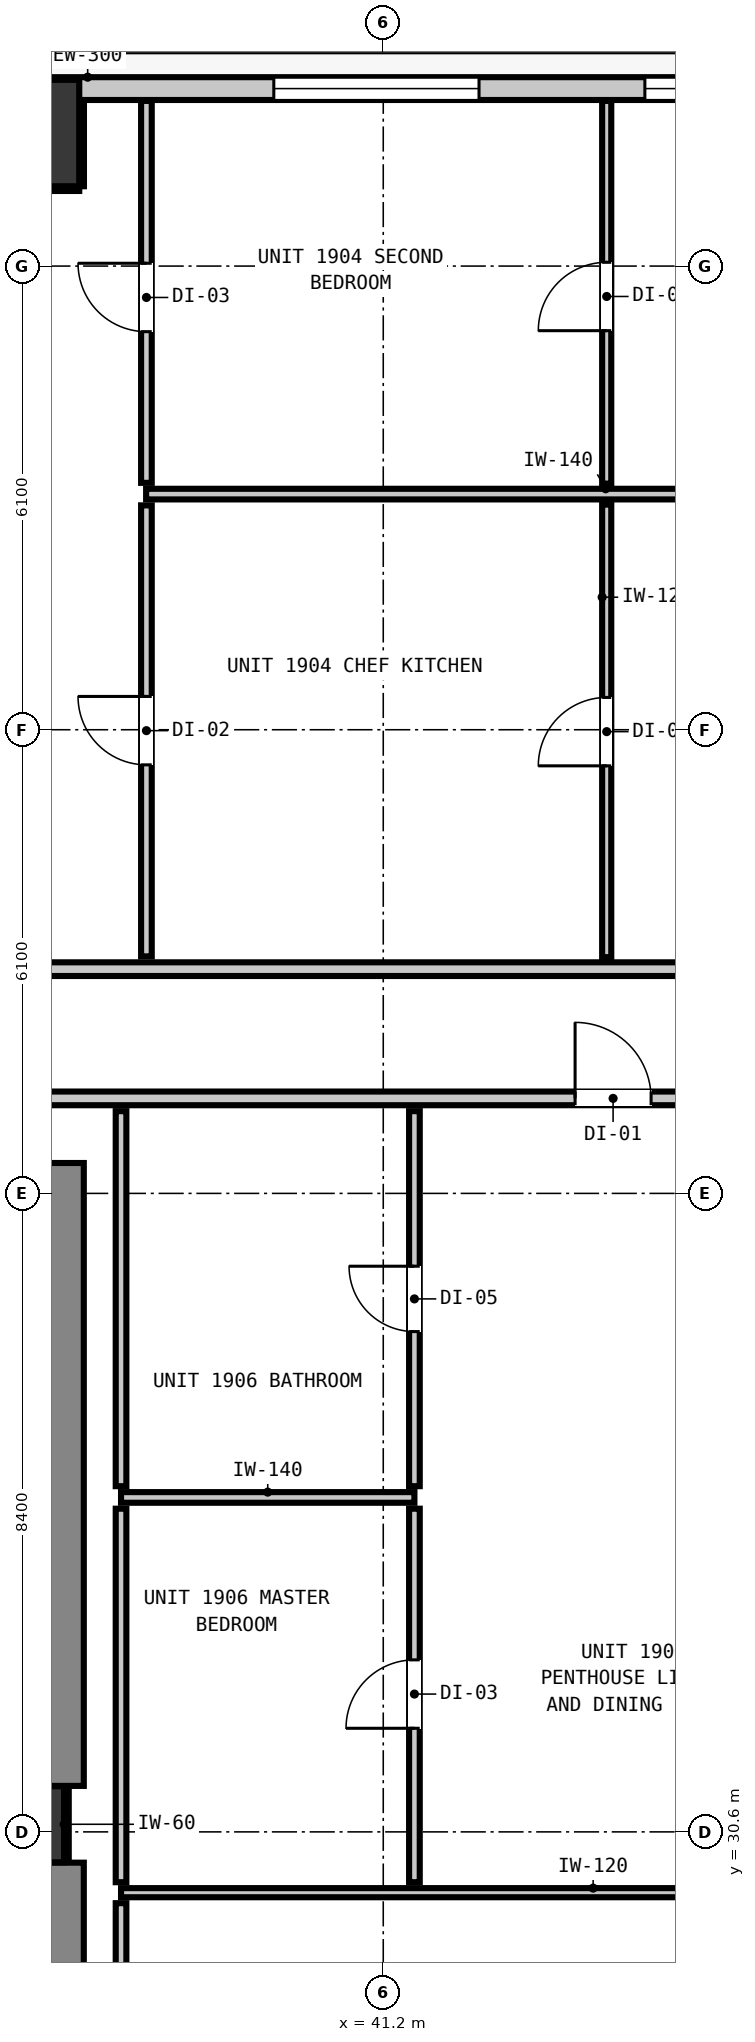
"""IFC4 building model, lengths in metres.
Left out: names, types, materials, properties, quantities, classifications, styles, units other than length and angle.
Written with IfcOpenShell. Run it as: python <this file> out.ifc"""

import sys

from ifc_helpers import new_model, si_unit, direction, frame, frame_2d, origin, origin_2d, place, context, subcontext, project, spatial, rectangle, extrude, element, fill, save


model = new_model("IFC4")
c1 = context("Model", 3, precision=1e-05, world=origin(), true_north=direction((0.0, 1.0)))
c2 = subcontext(c1, "Body", "Model", "MODEL_VIEW")
j1 = project(units=[si_unit("LENGTHUNIT", "METRE"), si_unit("PLANEANGLEUNIT", "RADIAN")], contexts=[c1])
p1 = place(None, origin())
s1 = spatial("IfcSite", under=j1, at=p1, CompositionType="ELEMENT")
p2 = place(p1, origin())
s2 = spatial("IfcBuilding", under=s1, at=p2, CompositionType="ELEMENT")
p3 = place(p2, frame((0.0, 0.0, 68.48)))
s3 = spatial("IfcBuildingStorey", under=s2, at=p3, CompositionType="ELEMENT", Elevation=68.48)
p4 = place(p3, frame((36.5, 30.7, 0.0), z_axis=(0.0, 0.0, 1.0), x_axis=(1.0, 0.0, 0.0)))
e1 = element("IfcColumn", 1, at=p4, inside=s3, PredefinedType="COLUMN", context=c2, shape_type="SweptSolid", body=[
    extrude(rectangle(XDim=1.0, YDim=1.0, at=origin_2d()), origin(), (0.0, 0.0, 1.0), 3.32),
])
p5 = place(p3, frame((36.66, 22.0, 0.0), z_axis=(0.0, 0.0, 1.0), x_axis=(0.0, 1.0, 0.0)))
e2 = element("IfcWall", 2, at=p5, inside=s3, PredefinedType="SHEAR", context=c2, shape_type="SweptSolid", body=[
    extrude(rectangle(XDim=8.195, YDim=1.2, at=frame_2d((4.098, 0.0))), origin(), (0.0, 0.0, 1.0), 3.32),
])
p6 = place(p3, frame((36.66, 31.205, 0.0), z_axis=(0.0, 0.0, 1.0), x_axis=(0.0, 1.0, 0.0)))
e3 = element("IfcWall", 3, at=p6, inside=s3, PredefinedType="SHEAR", context=c2, shape_type="SweptSolid", body=[
    extrude(rectangle(XDim=8.195, YDim=1.2, at=frame_2d((4.097, 0.0))), origin(), (0.0, 0.0, 1.0), 3.32),
])
p7 = place(p3, frame((36.5, 52.95, 0.0), z_axis=(0.0, 0.0, 1.0), x_axis=(1.0, 0.0, 0.0)))
e4 = element("IfcColumn", 4, at=p7, inside=s3, PredefinedType="COLUMN", context=c2, shape_type="SweptSolid", body=[
    extrude(rectangle(XDim=1.4, YDim=1.4, at=origin_2d()), origin(), (0.0, 0.0, 1.0), 3.32),
])
p8 = place(p3, frame((10.365, 53.535, 0.0), z_axis=(0.0, 0.0, 1.0), x_axis=(1.0, 0.0, 0.0)))
e5 = element("IfcWall", 5, at=p8, inside=s3, PredefinedType="STANDARD", context=c2, shape_type="SweptSolid", body=[
    extrude(rectangle(XDim=37.47, YDim=0.3, at=frame_2d((18.735, 0.0))), origin(), (0.0, 0.0, 1.0), 3.06),
])
p9 = place(p8, frame((4.403, 0.0, 0.0)))
e6 = element("IfcOpeningElement", 6, at=p9, cuts=e5, PredefinedType="OPENING", context=c2, shape_type="SweptSolid", body=[
    extrude(rectangle(XDim=1.0, YDim=2.15, at=frame_2d((0.5, 1.075))), frame((0.0, 0.16, 0.0), z_axis=(0.0, -1.0, 0.0), x_axis=(1.0, 0.0, 0.0)), (0.0, 0.0, 1.0), 0.32),
])
p10 = place(p8, frame((6.319, 0.0, 0.85)))
e7 = element("IfcOpeningElement", 7, at=p10, cuts=e5, PredefinedType="OPENING", context=c2, shape_type="SweptSolid", body=[
    extrude(rectangle(XDim=2.7, YDim=2.0, at=frame_2d((1.35, 1.0))), frame((0.0, 0.16, 0.0), z_axis=(0.0, -1.0, 0.0), x_axis=(1.0, 0.0, 0.0)), (0.0, 0.0, 1.0), 0.32),
])
p11 = place(p8, frame((0.324, 0.0, 0.85)))
e8 = element("IfcOpeningElement", 8, at=p11, cuts=e5, PredefinedType="OPENING", context=c2, shape_type="SweptSolid", body=[
    extrude(rectangle(XDim=0.58, YDim=1.5, at=frame_2d((0.29, 0.75))), frame((0.0, 0.16, 0.0), z_axis=(0.0, -1.0, 0.0), x_axis=(1.0, 0.0, 0.0)), (0.0, 0.0, 1.0), 0.32),
])
p12 = place(p8, frame((13.221, 0.0, 0.85)))
e9 = element("IfcOpeningElement", 9, at=p12, cuts=e5, PredefinedType="OPENING", context=c2, shape_type="SweptSolid", body=[
    extrude(rectangle(XDim=2.7, YDim=2.0, at=frame_2d((1.35, 1.0))), frame((0.0, 0.16, 0.0), z_axis=(0.0, -1.0, 0.0), x_axis=(1.0, 0.0, 0.0)), (0.0, 0.0, 1.0), 0.32),
])
p13 = place(p8, frame((21.797, 0.0, 0.85)))
e10 = element("IfcOpeningElement", 10, at=p13, cuts=e5, PredefinedType="OPENING", context=c2, shape_type="SweptSolid", body=[
    extrude(rectangle(XDim=2.7, YDim=2.0, at=frame_2d((1.35, 1.0))), frame((0.0, 0.16, 0.0), z_axis=(0.0, -1.0, 0.0), x_axis=(1.0, 0.0, 0.0)), (0.0, 0.0, 1.0), 0.32),
])
p14 = place(p8, frame((19.807, 0.0, 0.85)))
e11 = element("IfcOpeningElement", 11, at=p14, cuts=e5, PredefinedType="OPENING", context=c2, shape_type="SweptSolid", body=[
    extrude(rectangle(XDim=0.58, YDim=1.5, at=frame_2d((0.29, 0.75))), frame((0.0, 0.16, 0.0), z_axis=(0.0, -1.0, 0.0), x_axis=(1.0, 0.0, 0.0)), (0.0, 0.0, 1.0), 0.32),
])
p15 = place(p8, frame((29.395, 0.0, 0.85)))
e12 = element("IfcOpeningElement", 12, at=p15, cuts=e5, PredefinedType="OPENING", context=c2, shape_type="SweptSolid", body=[
    extrude(rectangle(XDim=2.7, YDim=2.0, at=frame_2d((1.35, 1.0))), frame((0.0, 0.16, 0.0), z_axis=(0.0, -1.0, 0.0), x_axis=(1.0, 0.0, 0.0)), (0.0, 0.0, 1.0), 0.32),
])
p16 = place(p8, frame((34.277, 0.0, 0.85)))
e13 = element("IfcOpeningElement", 13, at=p16, cuts=e5, PredefinedType="OPENING", context=c2, shape_type="SweptSolid", body=[
    extrude(rectangle(XDim=2.7, YDim=2.0, at=frame_2d((1.35, 1.0))), frame((0.0, 0.16, 0.0), z_axis=(0.0, -1.0, 0.0), x_axis=(1.0, 0.0, 0.0)), (0.0, 0.0, 1.0), 0.32),
])
p17 = place(p3, frame((10.15, 40.25, 0.0), z_axis=(0.0, 0.0, 1.0), x_axis=(1.0, 0.0, 0.0)))
e14 = element("IfcWall", 14, at=p17, inside=s3, PredefinedType="PARTITIONING", context=c2, shape_type="SweptSolid", body=[
    extrude(rectangle(XDim=40.023, YDim=0.18, at=frame_2d((20.012, 0.0))), origin(), (0.0, 0.0, 1.0), 3.06),
])
p18 = place(p17, frame((7.285, 0.0, 0.0)))
e15 = element("IfcOpeningElement", 15, at=p18, cuts=e14, PredefinedType="OPENING", context=c2, shape_type="SweptSolid", body=[
    extrude(rectangle(XDim=1.4, YDim=2.15, at=frame_2d((0.7, 1.075))), frame((0.0, 0.1, 0.0), z_axis=(0.0, -1.0, 0.0), x_axis=(1.0, 0.0, 0.0)), (0.0, 0.0, 1.0), 0.2),
])
p19 = place(p17, frame((0.324, 0.0, 0.0)))
e16 = element("IfcOpeningElement", 16, at=p19, cuts=e14, PredefinedType="OPENING", context=c2, shape_type="SweptSolid", body=[
    extrude(rectangle(XDim=1.4, YDim=2.15, at=frame_2d((0.7, 1.075))), frame((0.0, 0.1, 0.0), z_axis=(0.0, -1.0, 0.0), x_axis=(1.0, 0.0, 0.0)), (0.0, 0.0, 1.0), 0.2),
])
p20 = place(p17, frame((33.574, 0.0, 0.0)))
e17 = element("IfcOpeningElement", 17, at=p20, cuts=e14, PredefinedType="OPENING", context=c2, shape_type="SweptSolid", body=[
    extrude(rectangle(XDim=1.0, YDim=2.15, at=frame_2d((0.5, 1.075))), frame((0.0, 0.1, 0.0), z_axis=(0.0, -1.0, 0.0), x_axis=(1.0, 0.0, 0.0)), (0.0, 0.0, 1.0), 0.2),
])
p21 = place(p3, frame((8.027, 41.95, 0.0), z_axis=(0.0, 0.0, 1.0), x_axis=(1.0, 0.0, 0.0)))
e18 = element("IfcWall", 18, at=p21, inside=s3, PredefinedType="PARTITIONING", context=c2, shape_type="SweptSolid", body=[
    extrude(rectangle(XDim=42.146, YDim=0.18, at=frame_2d((21.073, 0.0))), origin(), (0.0, 0.0, 1.0), 3.06),
])
p22 = place(p21, frame((8.451, 0.0, 0.0)))
e19 = element("IfcOpeningElement", 19, at=p22, cuts=e18, PredefinedType="OPENING", context=c2, shape_type="SweptSolid", body=[
    extrude(rectangle(XDim=1.0, YDim=2.15, at=frame_2d((0.5, 1.075))), frame((0.0, 0.1, 0.0), z_axis=(0.0, -1.0, 0.0), x_axis=(1.0, 0.0, 0.0)), (0.0, 0.0, 1.0), 0.2),
])
p23 = place(p21, frame((26.075, 0.0, 0.0)))
e20 = element("IfcOpeningElement", 20, at=p23, cuts=e18, PredefinedType="OPENING", context=c2, shape_type="SweptSolid", body=[
    extrude(rectangle(XDim=1.0, YDim=2.15, at=frame_2d((0.5, 1.075))), frame((0.0, 0.1, 0.0), z_axis=(0.0, -1.0, 0.0), x_axis=(1.0, 0.0, 0.0)), (0.0, 0.0, 1.0), 0.2),
])
p24 = place(p3, frame((37.75, 35.0, 0.0), z_axis=(0.0, 0.0, 1.0), x_axis=(1.0, 0.0, 0.0)))
e21 = element("IfcWall", 21, at=p24, inside=s3, PredefinedType="PARTITIONING", context=c2, shape_type="SweptSolid", body=[
    extrude(rectangle(XDim=3.86, YDim=0.14, at=frame_2d((1.93, 0.0))), origin(), (0.0, 0.0, 1.0), 3.06),
])
p25 = place(p3, frame((38.08, 48.2, 0.0), z_axis=(0.0, 0.0, 1.0), x_axis=(1.0, 0.0, 0.0)))
e22 = element("IfcWall", 22, at=p25, inside=s3, PredefinedType="PARTITIONING", context=c2, shape_type="SweptSolid", body=[
    extrude(rectangle(XDim=12.093, YDim=0.14, at=frame_2d((6.046, 0.0))), origin(), (0.0, 0.0, 1.0), 3.06),
])
p26 = place(p3, frame((37.75, 29.8, 0.0), z_axis=(0.0, 0.0, 1.0), x_axis=(1.0, 0.0, 0.0)))
e23 = element("IfcWall", 23, at=p26, inside=s3, PredefinedType="PARTITIONING", context=c2, shape_type="SweptSolid", body=[
    extrude(rectangle(XDim=12.423, YDim=0.12, at=frame_2d((6.211, 0.0))), origin(), (0.0, 0.0, 1.0), 3.06),
])
p27 = place(p3, frame((37.75, 21.348, 0.0), z_axis=(0.0, 0.0, 1.0), x_axis=(0.0, 1.0, 0.0)))
e24 = element("IfcWall", 24, at=p27, inside=s3, PredefinedType="PARTITIONING", context=c2, shape_type="SweptSolid", body=[
    extrude(rectangle(XDim=8.314, YDim=0.14, at=frame_2d((4.157, 0.0))), origin(), (0.0, 0.0, 1.0), 3.06),
])
p28 = place(p3, frame((37.75, 29.938, 0.0), z_axis=(0.0, 0.0, 1.0), x_axis=(0.0, 1.0, 0.0)))
e25 = element("IfcWall", 25, at=p28, inside=s3, PredefinedType="PARTITIONING", context=c2, shape_type="SweptSolid", body=[
    extrude(rectangle(XDim=4.914, YDim=0.14, at=frame_2d((2.457, 0.0))), origin(), (0.0, 0.0, 1.0), 3.06),
])
p29 = place(p3, frame((37.75, 35.148, 0.0), z_axis=(0.0, 0.0, 1.0), x_axis=(0.0, 1.0, 0.0)))
e26 = element("IfcWall", 26, at=p29, inside=s3, PredefinedType="PARTITIONING", context=c2, shape_type="SweptSolid", body=[
    extrude(rectangle(XDim=4.934, YDim=0.14, at=frame_2d((2.467, 0.0))), origin(), (0.0, 0.0, 1.0), 3.06),
])
p30 = place(p3, frame((38.084, 42.118, 0.0), z_axis=(0.0, 0.0, 1.0), x_axis=(0.0, 1.0, 0.0)))
e27 = element("IfcWall", 27, at=p30, inside=s3, PredefinedType="PARTITIONING", context=c2, shape_type="SweptSolid", body=[
    extrude(rectangle(XDim=5.934, YDim=0.14, at=frame_2d((2.967, 0.0))), origin(), (0.0, 0.0, 1.0), 3.06),
])
p31 = place(p30, frame((2.52, 0.0, 0.0)))
e28 = element("IfcOpeningElement", 28, at=p31, cuts=e27, PredefinedType="OPENING", context=c2, shape_type="SweptSolid", body=[
    extrude(rectangle(XDim=0.9, YDim=2.1, at=frame_2d((0.45, 1.05))), frame((0.0, 0.08, 0.0), z_axis=(0.0, -1.0, 0.0), x_axis=(1.0, 0.0, 0.0)), (0.0, 0.0, 1.0), 0.16),
])
p32 = place(p3, frame((38.084, 48.348, 0.0), z_axis=(0.0, 0.0, 1.0), x_axis=(0.0, 1.0, 0.0)))
e29 = element("IfcWall", 29, at=p32, inside=s3, PredefinedType="PARTITIONING", context=c2, shape_type="SweptSolid", body=[
    extrude(rectangle(XDim=5.025, YDim=0.14, at=frame_2d((2.513, 0.0))), origin(), (0.0, 0.0, 1.0), 3.06),
])
p33 = place(p32, frame((1.989, 0.0, 0.0)))
e30 = element("IfcOpeningElement", 30, at=p33, cuts=e29, PredefinedType="OPENING", context=c2, shape_type="SweptSolid", body=[
    extrude(rectangle(XDim=0.9, YDim=2.1, at=frame_2d((0.45, 1.05))), frame((0.0, 0.08, 0.0), z_axis=(0.0, -1.0, 0.0), x_axis=(1.0, 0.0, 0.0)), (0.0, 0.0, 1.0), 0.16),
])
p34 = place(p3, frame((41.61, 29.938, 0.0), z_axis=(0.0, 0.0, 1.0), x_axis=(0.0, 1.0, 0.0)))
e31 = element("IfcWall", 31, at=p34, inside=s3, PredefinedType="PARTITIONING", context=c2, shape_type="SweptSolid", body=[
    extrude(rectangle(XDim=4.914, YDim=0.14, at=frame_2d((2.457, 0.0))), origin(), (0.0, 0.0, 1.0), 3.06),
])
p35 = place(p34, frame((2.025, 0.0, 0.0)))
e32 = element("IfcOpeningElement", 32, at=p35, cuts=e31, PredefinedType="OPENING", context=c2, shape_type="SweptSolid", body=[
    extrude(rectangle(XDim=0.9, YDim=2.1, at=frame_2d((0.45, 1.05))), frame((0.0, 0.08, 0.0), z_axis=(0.0, -1.0, 0.0), x_axis=(1.0, 0.0, 0.0)), (0.0, 0.0, 1.0), 0.16),
])
p36 = place(p3, frame((41.61, 35.148, 0.0), z_axis=(0.0, 0.0, 1.0), x_axis=(0.0, 1.0, 0.0)))
e33 = element("IfcWall", 33, at=p36, inside=s3, PredefinedType="PARTITIONING", context=c2, shape_type="SweptSolid", body=[
    extrude(rectangle(XDim=4.934, YDim=0.14, at=frame_2d((2.467, 0.0))), origin(), (0.0, 0.0, 1.0), 3.06),
])
p37 = place(p36, frame((2.034, 0.0, 0.0)))
e34 = element("IfcOpeningElement", 34, at=p37, cuts=e33, PredefinedType="OPENING", context=c2, shape_type="SweptSolid", body=[
    extrude(rectangle(XDim=0.86, YDim=2.02, at=frame_2d((0.43, 1.01))), frame((0.0, 0.08, 0.0), z_axis=(0.0, -1.0, 0.0), x_axis=(1.0, 0.0, 0.0)), (0.0, 0.0, 1.0), 0.16),
])
p38 = place(p3, frame((44.14, 42.108, 0.0), z_axis=(0.0, 0.0, 1.0), x_axis=(0.0, 1.0, 0.0)))
e35 = element("IfcWall", 35, at=p38, inside=s3, PredefinedType="PARTITIONING", context=c2, shape_type="SweptSolid", body=[
    extrude(rectangle(XDim=5.954, YDim=0.12, at=frame_2d((2.977, 0.0))), origin(), (0.0, 0.0, 1.0), 3.06),
])
p39 = place(p38, frame((2.517, 0.0, 0.0)))
e36 = element("IfcOpeningElement", 36, at=p39, cuts=e35, PredefinedType="OPENING", context=c2, shape_type="SweptSolid", body=[
    extrude(rectangle(XDim=0.9, YDim=2.1, at=frame_2d((0.45, 1.05))), frame((0.0, 0.07, 0.0), z_axis=(0.0, -1.0, 0.0), x_axis=(1.0, 0.0, 0.0)), (0.0, 0.0, 1.0), 0.14),
])
p40 = place(p3, frame((44.14, 48.338, 0.0), z_axis=(0.0, 0.0, 1.0), x_axis=(0.0, 1.0, 0.0)))
e37 = element("IfcWall", 37, at=p40, inside=s3, PredefinedType="PARTITIONING", context=c2, shape_type="SweptSolid", body=[
    extrude(rectangle(XDim=5.035, YDim=0.12, at=frame_2d((2.518, 0.0))), origin(), (0.0, 0.0, 1.0), 3.06),
])
p41 = place(p40, frame((2.012, 0.0, 0.0)))
e38 = element("IfcOpeningElement", 38, at=p41, cuts=e37, PredefinedType="OPENING", context=c2, shape_type="SweptSolid", body=[
    extrude(rectangle(XDim=0.9, YDim=2.1, at=frame_2d((0.45, 1.05))), frame((0.0, 0.07, 0.0), z_axis=(0.0, -1.0, 0.0), x_axis=(1.0, 0.0, 0.0)), (0.0, 0.0, 1.0), 0.14),
])
p42 = place(p3, frame((37.032, 30.21, 0.0), z_axis=(0.0, 0.0, 1.0), x_axis=(0.0, 1.0, 0.0)))
e39 = element("IfcWall", 39, at=p42, inside=s3, PredefinedType="PARTITIONING", context=c2, shape_type="SweptSolid", body=[
    extrude(rectangle(XDim=0.98, YDim=0.06, at=frame_2d((0.49, 0.0))), origin(), (0.0, 0.0, 1.0), 1.45),
])
p43 = place(p3, frame((35.8, 52.218, 0.0), z_axis=(0.0, 0.0, 1.0), x_axis=(1.0, 0.0, 0.0)))
e40 = element("IfcWall", 40, at=p43, inside=s3, PredefinedType="PARTITIONING", context=c2, shape_type="SweptSolid", body=[
    extrude(rectangle(XDim=1.4, YDim=0.06, at=frame_2d((0.7, 0.0))), origin(), (0.0, 0.0, 1.0), 1.45),
])
p44 = place(p3, frame((37.232, 52.25, 0.0), z_axis=(0.0, 0.0, 1.0), x_axis=(0.0, 1.0, 0.0)))
e41 = element("IfcWall", 41, at=p44, inside=s3, PredefinedType="PARTITIONING", context=c2, shape_type="SweptSolid", body=[
    extrude(rectangle(XDim=1.12, YDim=0.06, at=frame_2d((0.56, 0.0))), origin(), (0.0, 0.0, 1.0), 1.45),
])
p45 = place(p15, origin())
e42 = element("IfcWindow", 42, at=p45, inside=s3, PartitioningType="SINGLE_PANEL", PredefinedType="WINDOW", context=c2, shape_type="SweptSolid", body=[
    extrude(rectangle(XDim=2.7, YDim=2.0, at=frame_2d((1.35, 1.0))), frame((0.0, 0.03, 0.0), z_axis=(0.0, -1.0, 0.0), x_axis=(1.0, 0.0, 0.0)), (0.0, 0.0, 1.0), 0.06),
])
fill(e12, e42)
p46 = place(p16, origin())
e43 = element("IfcWindow", 43, at=p46, inside=s3, PartitioningType="SINGLE_PANEL", PredefinedType="WINDOW", context=c2, shape_type="SweptSolid", body=[
    extrude(rectangle(XDim=2.7, YDim=2.0, at=frame_2d((1.35, 1.0))), frame((0.0, 0.03, 0.0), z_axis=(0.0, -1.0, 0.0), x_axis=(1.0, 0.0, 0.0)), (0.0, 0.0, 1.0), 0.06),
])
fill(e13, e43)
p47 = place(p31, origin())
e44 = element("IfcDoor", 44, at=p47, inside=s3, OperationType="SINGLE_SWING_RIGHT", PredefinedType="DOOR", context=c2, shape_type="SweptSolid", body=[
    extrude(rectangle(XDim=0.9, YDim=2.1, at=frame_2d((0.45, 1.05))), frame((0.0, 0.025, 0.0), z_axis=(0.0, -1.0, 0.0), x_axis=(1.0, 0.0, 0.0)), (0.0, 0.0, 1.0), 0.05),
])
fill(e28, e44)
p48 = place(p39, origin())
e45 = element("IfcDoor", 45, at=p48, inside=s3, OperationType="SINGLE_SWING_LEFT", PredefinedType="DOOR", context=c2, shape_type="SweptSolid", body=[
    extrude(rectangle(XDim=0.9, YDim=2.1, at=frame_2d((0.45, 1.05))), frame((0.0, 0.025, 0.0), z_axis=(0.0, -1.0, 0.0), x_axis=(1.0, 0.0, 0.0)), (0.0, 0.0, 1.0), 0.05),
])
fill(e36, e45)
p49 = place(p33, origin())
e46 = element("IfcDoor", 46, at=p49, inside=s3, OperationType="SINGLE_SWING_RIGHT", PredefinedType="DOOR", context=c2, shape_type="SweptSolid", body=[
    extrude(rectangle(XDim=0.9, YDim=2.1, at=frame_2d((0.45, 1.05))), frame((0.0, 0.025, 0.0), z_axis=(0.0, -1.0, 0.0), x_axis=(1.0, 0.0, 0.0)), (0.0, 0.0, 1.0), 0.05),
])
fill(e30, e46)
p50 = place(p41, origin())
e47 = element("IfcDoor", 47, at=p50, inside=s3, OperationType="SINGLE_SWING_LEFT", PredefinedType="DOOR", context=c2, shape_type="SweptSolid", body=[
    extrude(rectangle(XDim=0.9, YDim=2.1, at=frame_2d((0.45, 1.05))), frame((0.0, 0.025, 0.0), z_axis=(0.0, -1.0, 0.0), x_axis=(1.0, 0.0, 0.0)), (0.0, 0.0, 1.0), 0.05),
])
fill(e38, e47)
p51 = place(p20, origin())
e48 = element("IfcDoor", 48, at=p51, inside=s3, OperationType="SINGLE_SWING_LEFT", PredefinedType="DOOR", context=c2, shape_type="SweptSolid", body=[
    extrude(rectangle(XDim=1.0, YDim=2.15, at=frame_2d((0.5, 1.075))), frame((0.0, 0.025, 0.0), z_axis=(0.0, -1.0, 0.0), x_axis=(1.0, 0.0, 0.0)), (0.0, 0.0, 1.0), 0.05),
])
fill(e17, e48)
p52 = place(p37, origin())
e49 = element("IfcDoor", 49, at=p52, inside=s3, OperationType="SINGLE_SWING_RIGHT", PredefinedType="DOOR", context=c2, shape_type="SweptSolid", body=[
    extrude(rectangle(XDim=0.86, YDim=2.02, at=frame_2d((0.43, 1.01))), frame((0.0, 0.025, 0.0), z_axis=(0.0, -1.0, 0.0), x_axis=(1.0, 0.0, 0.0)), (0.0, 0.0, 1.0), 0.05),
])
fill(e34, e49)
p53 = place(p35, origin())
e50 = element("IfcDoor", 50, at=p53, inside=s3, OperationType="SINGLE_SWING_LEFT", PredefinedType="DOOR", context=c2, shape_type="SweptSolid", body=[
    extrude(rectangle(XDim=0.9, YDim=2.1, at=frame_2d((0.45, 1.05))), frame((0.0, 0.025, 0.0), z_axis=(0.0, -1.0, 0.0), x_axis=(1.0, 0.0, 0.0)), (0.0, 0.0, 1.0), 0.05),
])
fill(e32, e50)
save(model, sys.argv[1])
